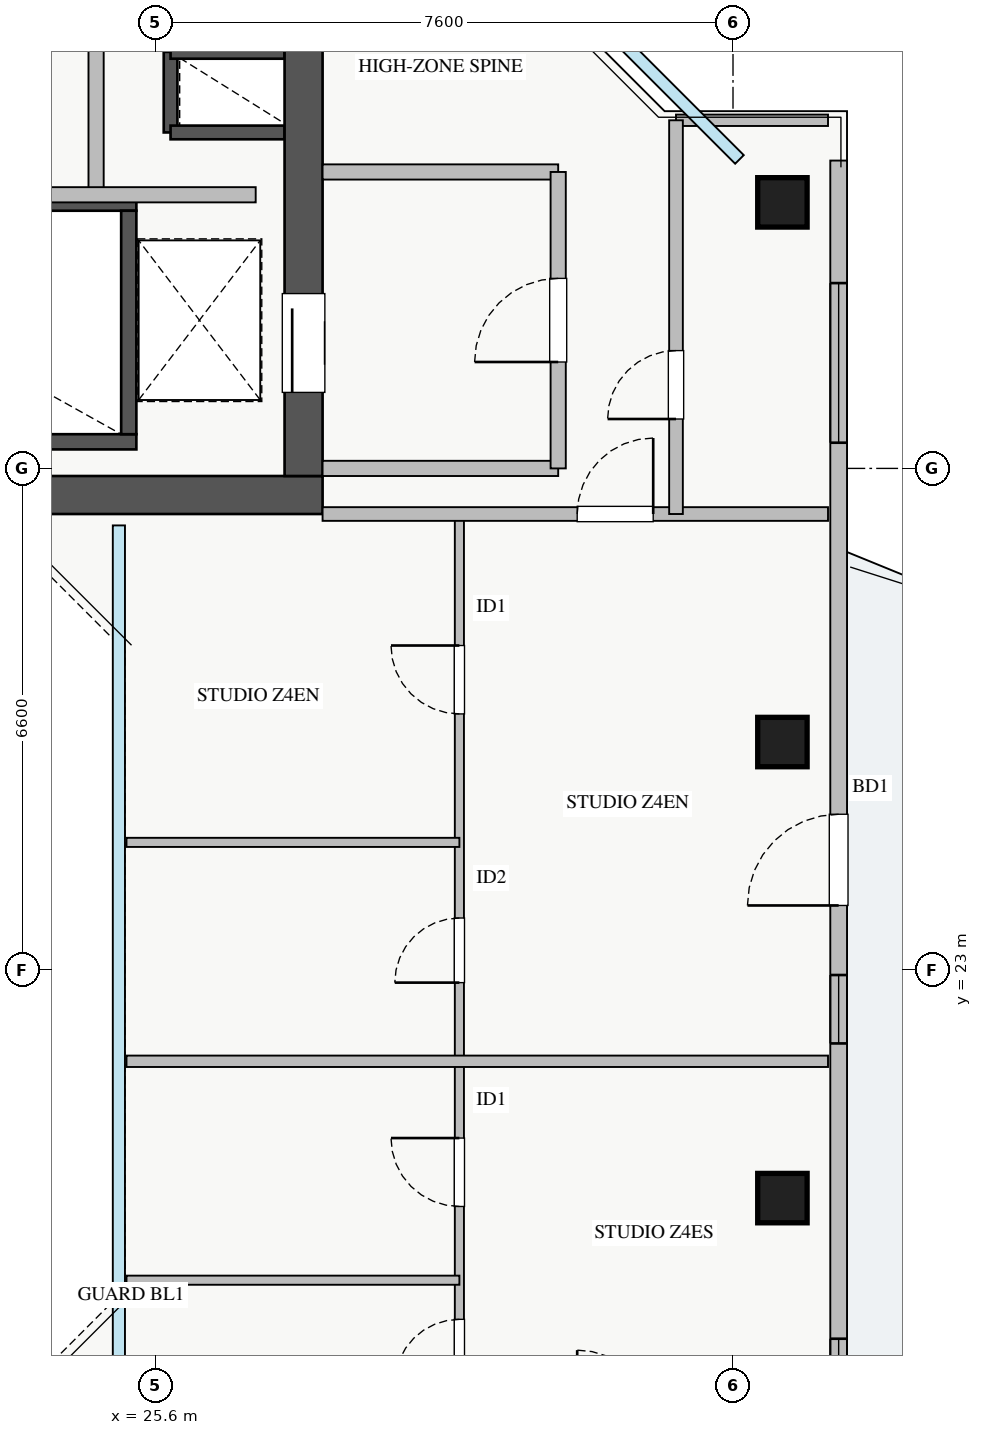
"""IFC4 building model, lengths in metres.
Left out: names, types, materials, properties, quantities, classifications, styles, units other than length and angle.
Written with IfcOpenShell. Run it as: python <this file> out.ifc"""

import sys

from ifc_helpers import new_model, si_unit, direction, frame, frame_2d, origin, origin_2d, place, context, subcontext, project, spatial, rectangle, extrude, source, transform, mapped, element, fill, save


model = new_model("IFC4")
c1 = context("Model", 3, precision=1e-05, world=origin(), true_north=direction((0.0, 1.0)))
c2 = subcontext(c1, "Body", "Model", "MODEL_VIEW")
j1 = project(units=[si_unit("LENGTHUNIT", "METRE"), si_unit("PLANEANGLEUNIT", "RADIAN")], contexts=[c1])
p1 = place(None, origin())
s1 = spatial("IfcSite", under=j1, at=p1, CompositionType="ELEMENT")
p2 = place(p1, origin())
s2 = spatial("IfcBuilding", under=s1, at=p2, CompositionType="ELEMENT")
p3 = place(p2, frame((0.0, 0.0, 253.5)))
s3 = spatial("IfcBuildingStorey", under=s2, at=p3, CompositionType="ELEMENT", Elevation=253.5)
p4 = place(p3, frame((25.8, 34.02, 0.0), z_axis=(0.0, 0.0, 1.0), x_axis=(0.0, 1.0, 0.0)))
e1 = element("IfcWall", 1, at=p4, inside=s3, PredefinedType="SHEAR", context=c2, shape_type="SweptSolid", body=[
    extrude(rectangle(XDim=1.06, YDim=0.18, at=frame_2d((0.53, 0.0))), origin(), (0.0, 0.0, 1.0), 3.07),
])
for number, where, z_axis, x_axis in (
    (2, (25.8, 35.08, 0.0), (0.0, 0.0, 1.0), (1.0, 0.0, 0.0)),
    (3, (25.8, 34.02, 0.0), (0.0, 0.0, 1.0), (1.0, 0.0, 0.0)),
):
    element("IfcWall", number, at=place(p3, frame(where, z_axis=z_axis, x_axis=x_axis)), inside=s3, PredefinedType="SHEAR", context=c2, shape_type="SweptSolid", body=[
        extrude(rectangle(XDim=1.5, YDim=0.18, at=frame_2d((0.75, 0.0))), origin(), (0.0, 0.0, 1.0), 3.07),
    ])
p5 = place(p3, frame((18.2, 29.95, 0.0), z_axis=(0.0, 0.0, 1.0), x_axis=(1.0, 0.0, 0.0)))
e4 = element("IfcWall", 4, at=p5, inside=s3, PredefinedType="SHEAR", context=c2, shape_type="SweptSolid", body=[
    extrude(rectangle(XDim=7.15, YDim=0.2, at=frame_2d((3.575, 0.0))), origin(), (0.0, 0.0, 1.0), 3.25),
])
p6 = place(p3, frame((18.2, 33.09, 0.0), z_axis=(0.0, 0.0, 1.0), x_axis=(1.0, 0.0, 0.0)))
e5 = element("IfcWall", 5, at=p6, inside=s3, PredefinedType="SHEAR", context=c2, shape_type="SweptSolid", body=[
    extrude(rectangle(XDim=7.15, YDim=0.2, at=frame_2d((3.575, 0.0))), origin(), (0.0, 0.0, 1.0), 3.25),
])
p7 = place(p6, frame((0.35, 0.0, 0.0)))
e6 = element("IfcOpeningElement", 6, at=p7, cuts=e5, PredefinedType="OPENING", context=c2, shape_type="SweptSolid", body=[
    extrude(rectangle(XDim=1.1, YDim=2.05, at=frame_2d((0.55, 1.025))), frame((0.0, 0.11, 0.0), z_axis=(0.0, -1.0, 0.0), x_axis=(1.0, 0.0, 0.0)), (0.0, 0.0, 1.0), 0.22),
])
p8 = place(p3, frame((25.25, 30.05, 0.0), z_axis=(0.0, 0.0, 1.0), x_axis=(0.0, 1.0, 0.0)))
e7 = element("IfcWall", 7, at=p8, inside=s3, PredefinedType="SHEAR", context=c2, shape_type="SweptSolid", body=[
    extrude(rectangle(XDim=2.94, YDim=0.2, at=frame_2d((1.47, 0.0))), origin(), (0.0, 0.0, 1.0), 3.25),
])
p9 = place(p3, frame((10.2, 29.25, 0.0), z_axis=(0.0, 0.0, 1.0), x_axis=(1.0, 0.0, 0.0)))
e8 = element("IfcWall", 8, at=p9, inside=s3, PredefinedType="SHEAR", context=c2, shape_type="SweptSolid", body=[
    extrude(rectangle(XDim=17.6, YDim=0.5, at=frame_2d((8.8, 0.0))), origin(), (0.0, 0.0, 1.0), 3.25),
])
p10 = place(p3, frame((27.55, 29.5, 0.0), z_axis=(0.0, 0.0, 1.0), x_axis=(0.0, 1.0, 0.0)))
e9 = element("IfcWall", 9, at=p10, inside=s3, PredefinedType="SHEAR", context=c2, shape_type="SweptSolid", body=[
    extrude(rectangle(XDim=6.2, YDim=0.5, at=frame_2d((3.1, 0.0))), origin(), (0.0, 0.0, 1.0), 3.25),
])
p11 = place(p10, frame((1.1, 0.0, 0.0)))
e10 = element("IfcOpeningElement", 10, at=p11, cuts=e9, PredefinedType="OPENING", context=c2, shape_type="SweptSolid", body=[
    extrude(rectangle(XDim=1.3, YDim=2.05, at=frame_2d((0.65, 1.025))), frame((0.0, 0.26, 0.0), z_axis=(0.0, -1.0, 0.0), x_axis=(1.0, 0.0, 0.0)), (0.0, 0.0, 1.0), 0.52),
])
m1 = source(origin(), c2, "Body", "SweptSolid", [
    extrude(rectangle(XDim=0.65, YDim=0.65, at=origin_2d()), origin(), (0.0, 0.0, 1.0), 3.25),
])
for number, where, z_axis, x_axis in (
    (11, (33.85, 20.0, 0.0), (0.0, 0.0, 1.0), (1.0, 0.0, 0.0)),
    (12, (33.85, 26.0, 0.0), (0.0, 0.0, 1.0), (1.0, 0.0, 0.0)),
    (13, (33.85, 33.1, 0.0), (0.0, 0.0, 1.0), (1.0, 0.0, 0.0)),
):
    element("IfcColumn", number, at=place(p3, frame(where, z_axis=z_axis, x_axis=x_axis)), inside=s3, PredefinedType="COLUMN", context=c2, shape_type="MappedRepresentation", body=[
        mapped(m1, transform((0.0, 0.0, 0.0), x_axis=(1.0, 0.0, 0.0), y_axis=(0.0, 1.0, 0.0), z_axis=(0.0, 0.0, 1.0), scale=1.0)),
    ])
p12 = place(p3, frame((34.59, 12.35, 0.0), z_axis=(0.0, 0.0, 1.0), x_axis=(0.0, 1.0, 0.0)))
e14 = element("IfcWall", 14, at=p12, inside=s3, PredefinedType="STANDARD", context=c2, shape_type="SweptSolid", body=[
    extrude(rectangle(XDim=21.3, YDim=0.22, at=frame_2d((10.65, 0.0))), origin(), (0.0, 0.0, 1.0), 2.61),
])
p13 = place(p12, frame((11.5, 0.0, 0.0)))
e15 = element("IfcOpeningElement", 15, at=p13, cuts=e14, PredefinedType="OPENING", context=c2, shape_type="SweptSolid", body=[
    extrude(rectangle(XDim=1.2, YDim=2.1, at=frame_2d((0.6, 1.05))), frame((0.0, 0.12, 0.0), z_axis=(0.0, -1.0, 0.0), x_axis=(1.0, 0.0, 0.0)), (0.0, 0.0, 1.0), 0.24),
])
p14 = place(p12, frame((1.463, 0.0, 0.9)))
e16 = element("IfcOpeningElement", 16, at=p14, cuts=e14, PredefinedType="OPENING", context=c2, shape_type="SweptSolid", body=[
    extrude(rectangle(XDim=2.4, YDim=1.48, at=frame_2d((1.2, 0.74))), frame((0.0, 0.12, 0.0), z_axis=(0.0, -1.0, 0.0), x_axis=(1.0, 0.0, 0.0)), (0.0, 0.0, 1.0), 0.24),
])
p15 = place(p12, frame((17.588, 0.0, 0.9)))
e17 = element("IfcOpeningElement", 17, at=p15, cuts=e14, PredefinedType="OPENING", context=c2, shape_type="SweptSolid", body=[
    extrude(rectangle(XDim=2.1, YDim=1.48, at=frame_2d((1.05, 0.74))), frame((0.0, 0.12, 0.0), z_axis=(0.0, -1.0, 0.0), x_axis=(1.0, 0.0, 0.0)), (0.0, 0.0, 1.0), 0.24),
])
p16 = place(p12, frame((4.9, 0.0, 0.9)))
e18 = element("IfcOpeningElement", 18, at=p16, cuts=e14, PredefinedType="OPENING", context=c2, shape_type="SweptSolid", body=[
    extrude(rectangle(XDim=0.9, YDim=1.2, at=frame_2d((0.45, 0.6))), frame((0.0, 0.12, 0.0), z_axis=(0.0, -1.0, 0.0), x_axis=(1.0, 0.0, 0.0)), (0.0, 0.0, 1.0), 0.24),
])
p17 = place(p12, frame((9.685, 0.0, 0.9)))
e19 = element("IfcOpeningElement", 19, at=p17, cuts=e14, PredefinedType="OPENING", context=c2, shape_type="SweptSolid", body=[
    extrude(rectangle(XDim=0.9, YDim=1.2, at=frame_2d((0.45, 0.6))), frame((0.0, 0.12, 0.0), z_axis=(0.0, -1.0, 0.0), x_axis=(1.0, 0.0, 0.0)), (0.0, 0.0, 1.0), 0.24),
])
for number, where, z_axis, x_axis in (
    (20, (27.8, 29.6, 0.0), (0.0, 0.0, 1.0), (1.0, 0.0, 0.0)),
    (21, (27.8, 33.5, 0.0), (0.0, 0.0, 1.0), (1.0, 0.0, 0.0)),
):
    element("IfcWall", number, at=place(p3, frame(where, z_axis=z_axis, x_axis=x_axis)), inside=s3, PredefinedType="PARTITIONING", context=c2, shape_type="SweptSolid", body=[
        extrude(rectangle(XDim=3.1, YDim=0.2, at=frame_2d((1.55, 0.0))), origin(), (0.0, 0.0, 1.0), 3.07),
    ])
p18 = place(p3, frame((30.9, 29.6, 0.0), z_axis=(0.0, 0.0, 1.0), x_axis=(0.0, 1.0, 0.0)))
e22 = element("IfcWall", 22, at=p18, inside=s3, PredefinedType="PARTITIONING", context=c2, shape_type="SweptSolid", body=[
    extrude(rectangle(XDim=3.9, YDim=0.2, at=frame_2d((1.95, 0.0))), origin(), (0.0, 0.0, 1.0), 2.771),
])
p19 = place(p18, frame((1.4, 0.0, 0.0)))
e23 = element("IfcOpeningElement", 23, at=p19, cuts=e22, PredefinedType="OPENING", context=c2, shape_type="SweptSolid", body=[
    extrude(rectangle(XDim=1.1, YDim=2.05, at=frame_2d((0.55, 1.025))), frame((0.0, 0.11, 0.0), z_axis=(0.0, -1.0, 0.0), x_axis=(1.0, 0.0, 0.0)), (0.0, 0.0, 1.0), 0.22),
])
p20 = place(p3, frame((24.82, 33.2, 0.0), z_axis=(0.0, 0.0, 1.0), x_axis=(0.0, 1.0, 0.0)))
e24 = element("IfcWall", 24, at=p20, inside=s3, PredefinedType="PARTITIONING", context=c2, shape_type="SweptSolid", body=[
    extrude(rectangle(XDim=2.65, YDim=0.2, at=frame_2d((1.325, 0.0))), origin(), (0.0, 0.0, 1.0), 3.07),
])
p21 = place(p3, frame((21.75, 33.2, 0.0), z_axis=(0.0, 0.0, 1.0), x_axis=(1.0, 0.0, 0.0)))
e25 = element("IfcWall", 25, at=p21, inside=s3, PredefinedType="PARTITIONING", context=c2, shape_type="SweptSolid", body=[
    extrude(rectangle(XDim=5.17, YDim=0.2, at=frame_2d((2.585, 0.0))), origin(), (0.0, 0.0, 1.0), 3.07),
])
p22 = place(p3, frame((29.6, 17.0, 0.0), z_axis=(0.0, 0.0, 1.0), x_axis=(0.0, 1.0, 0.0)))
e26 = element("IfcWall", 26, at=p22, inside=s3, PredefinedType="PLUMBINGWALL", context=c2, shape_type="SweptSolid", body=[
    extrude(rectangle(XDim=4.8, YDim=0.12, at=frame_2d((2.4, 0.0))), origin(), (0.0, 0.0, 1.0), 3.07),
])
p23 = place(p22, frame((0.555, 0.0, 0.0)))
e27 = element("IfcOpeningElement", 27, at=p23, cuts=e26, PredefinedType="OPENING", context=c2, shape_type="SweptSolid", body=[
    extrude(rectangle(XDim=0.85, YDim=2.05, at=frame_2d((0.425, 1.025))), frame((0.0, 0.07, 0.0), z_axis=(0.0, -1.0, 0.0), x_axis=(1.0, 0.0, 0.0)), (0.0, 0.0, 1.0), 0.14),
])
p24 = place(p22, frame((2.89, 0.0, 0.0)))
e28 = element("IfcOpeningElement", 28, at=p24, cuts=e26, PredefinedType="OPENING", context=c2, shape_type="SweptSolid", body=[
    extrude(rectangle(XDim=0.9, YDim=2.05, at=frame_2d((0.45, 1.025))), frame((0.0, 0.07, 0.0), z_axis=(0.0, -1.0, 0.0), x_axis=(1.0, 0.0, 0.0)), (0.0, 0.0, 1.0), 0.14),
])
p25 = place(p3, frame((25.22, 18.92, 0.0), z_axis=(0.0, 0.0, 1.0), x_axis=(1.0, 0.0, 0.0)))
e29 = element("IfcWall", 29, at=p25, inside=s3, PredefinedType="PLUMBINGWALL", context=c2, shape_type="SweptSolid", body=[
    extrude(rectangle(XDim=4.38, YDim=0.12, at=frame_2d((2.19, 0.0))), origin(), (0.0, 0.0, 1.0), 3.07),
])
p26 = place(p3, frame((29.6, 21.8, 0.0), z_axis=(0.0, 0.0, 1.0), x_axis=(0.0, 1.0, 0.0)))
e30 = element("IfcWall", 30, at=p26, inside=s3, PredefinedType="PLUMBINGWALL", context=c2, shape_type="SweptSolid", body=[
    extrude(rectangle(XDim=7.2, YDim=0.12, at=frame_2d((3.6, 0.0))), origin(), (0.0, 0.0, 1.0), 3.07),
])
p27 = place(p26, frame((1.035, 0.0, 0.0)))
e31 = element("IfcOpeningElement", 31, at=p27, cuts=e30, PredefinedType="OPENING", context=c2, shape_type="SweptSolid", body=[
    extrude(rectangle(XDim=0.85, YDim=2.05, at=frame_2d((0.425, 1.025))), frame((0.0, 0.07, 0.0), z_axis=(0.0, -1.0, 0.0), x_axis=(1.0, 0.0, 0.0)), (0.0, 0.0, 1.0), 0.14),
])
p28 = place(p26, frame((4.57, 0.0, 0.0)))
e32 = element("IfcOpeningElement", 32, at=p28, cuts=e30, PredefinedType="OPENING", context=c2, shape_type="SweptSolid", body=[
    extrude(rectangle(XDim=0.9, YDim=2.05, at=frame_2d((0.45, 1.025))), frame((0.0, 0.07, 0.0), z_axis=(0.0, -1.0, 0.0), x_axis=(1.0, 0.0, 0.0)), (0.0, 0.0, 1.0), 0.14),
])
p29 = place(p3, frame((25.22, 24.68, 0.0), z_axis=(0.0, 0.0, 1.0), x_axis=(1.0, 0.0, 0.0)))
e33 = element("IfcWall", 33, at=p29, inside=s3, PredefinedType="PLUMBINGWALL", context=c2, shape_type="SweptSolid", body=[
    extrude(rectangle(XDim=4.38, YDim=0.12, at=frame_2d((2.19, 0.0))), origin(), (0.0, 0.0, 1.0), 3.07),
])
p30 = place(p3, frame((25.22, 21.8, 0.0), z_axis=(0.0, 0.0, 1.0), x_axis=(1.0, 0.0, 0.0)))
e34 = element("IfcWall", 34, at=p30, inside=s3, PredefinedType="PARTITIONING", context=c2, shape_type="SweptSolid", body=[
    extrude(rectangle(XDim=9.23, YDim=0.15, at=frame_2d((4.615, 0.0))), origin(), (0.0, 0.0, 1.0), 3.07),
])
p31 = place(p3, frame((27.8, 29.0, 0.0), z_axis=(0.0, 0.0, 1.0), x_axis=(1.0, 0.0, 0.0)))
e35 = element("IfcWall", 35, at=p31, inside=s3, PredefinedType="PARTITIONING", context=c2, shape_type="SweptSolid", body=[
    extrude(rectangle(XDim=6.65, YDim=0.18, at=frame_2d((3.325, 0.0))), origin(), (0.0, 0.0, 1.0), 3.07),
])
p32 = place(p31, frame((3.35, 0.0, 0.0)))
e36 = element("IfcOpeningElement", 36, at=p32, cuts=e35, PredefinedType="OPENING", context=c2, shape_type="SweptSolid", body=[
    extrude(rectangle(XDim=1.0, YDim=2.05, at=frame_2d((0.5, 1.025))), frame((0.0, 0.1, 0.0), z_axis=(0.0, -1.0, 0.0), x_axis=(1.0, 0.0, 0.0)), (0.0, 0.0, 1.0), 0.2),
])
p33 = place(p3, frame((32.45, 34.18, 0.0), z_axis=(0.0, 0.0, 1.0), x_axis=(1.0, 0.0, 0.0)))
e37 = element("IfcWall", 37, at=p33, inside=s3, PredefinedType="PARTITIONING", context=c2, shape_type="SweptSolid", body=[
    extrude(rectangle(XDim=2.0, YDim=0.15, at=frame_2d((1.0, 0.0))), origin(), (0.0, 0.0, 1.0), 3.07),
])
p34 = place(p3, frame((32.45, 29.0, 0.0), z_axis=(0.0, 0.0, 1.0), x_axis=(0.0, 1.0, 0.0)))
e38 = element("IfcWall", 38, at=p34, inside=s3, PredefinedType="PARTITIONING", context=c2, shape_type="SweptSolid", body=[
    extrude(rectangle(XDim=5.18, YDim=0.18, at=frame_2d((2.59, 0.0))), origin(), (0.0, 0.0, 1.0), 3.07),
])
p35 = place(p34, frame((1.25, 0.0, 0.0)))
e39 = element("IfcOpeningElement", 39, at=p35, cuts=e38, PredefinedType="OPENING", context=c2, shape_type="SweptSolid", body=[
    extrude(rectangle(XDim=0.9, YDim=2.05, at=frame_2d((0.45, 1.025))), frame((0.0, 0.1, 0.0), z_axis=(0.0, -1.0, 0.0), x_axis=(1.0, 0.0, 0.0)), (0.0, 0.0, 1.0), 0.2),
])
m2 = source(origin(), c2, "Body", "SweptSolid", [
    extrude(rectangle(XDim=1.2, YDim=2.1, at=frame_2d((0.6, 1.05))), frame((0.0, 0.025, 0.0), z_axis=(0.0, -1.0, 0.0), x_axis=(1.0, 0.0, 0.0)), (0.0, 0.0, 1.0), 0.05),
])
p36 = place(p13, origin())
e40 = element("IfcDoor", 40, at=p36, inside=s3, OperationType="SINGLE_SWING_LEFT", PredefinedType="DOOR", context=c2, shape_type="MappedRepresentation", body=[
    mapped(m2, transform((0.0, 0.0, 0.0), x_axis=(1.0, 0.0, 0.0), y_axis=(0.0, 1.0, 0.0), z_axis=(0.0, 0.0, 1.0), scale=1.0)),
])
fill(e15, e40)
m3 = source(origin(), c2, "Body", "SweptSolid", [
    extrude(rectangle(XDim=2.1, YDim=1.48, at=frame_2d((1.05, 0.74))), frame((0.0, 0.03, 0.0), z_axis=(0.0, -1.0, 0.0), x_axis=(1.0, 0.0, 0.0)), (0.0, 0.0, 1.0), 0.06),
])
p37 = place(p15, origin())
e41 = element("IfcWindow", 41, at=p37, inside=s3, PartitioningType="TRIPLE_PANEL_VERTICAL", PredefinedType="WINDOW", context=c2, shape_type="MappedRepresentation", body=[
    mapped(m3, transform((0.0, 0.0, 0.0), x_axis=(1.0, 0.0, 0.0), y_axis=(0.0, 1.0, 0.0), z_axis=(0.0, 0.0, 1.0), scale=1.0)),
])
fill(e17, e41)
m4 = source(origin(), c2, "Body", "SweptSolid", [
    extrude(rectangle(XDim=1.3, YDim=2.05, at=frame_2d((0.65, 1.025))), frame((0.0, 0.025, 0.0), z_axis=(0.0, -1.0, 0.0), x_axis=(1.0, 0.0, 0.0)), (0.0, 0.0, 1.0), 0.05),
])
p38 = place(p11, origin())
e42 = element("IfcDoor", 42, at=p38, inside=s3, OperationType="SLIDING_TO_LEFT", PredefinedType="DOOR", context=c2, shape_type="MappedRepresentation", body=[
    mapped(m4, transform((0.0, 0.0, 0.0), x_axis=(1.0, 0.0, 0.0), y_axis=(0.0, 1.0, 0.0), z_axis=(0.0, 0.0, 1.0), scale=1.0)),
])
fill(e10, e42)
m5 = source(origin(), c2, "Body", "SweptSolid", [
    extrude(rectangle(XDim=1.1, YDim=2.05, at=frame_2d((0.55, 1.025))), frame((0.0, 0.025, 0.0), z_axis=(0.0, -1.0, 0.0), x_axis=(1.0, 0.0, 0.0)), (0.0, 0.0, 1.0), 0.05),
])
p39 = place(p19, origin())
e43 = element("IfcDoor", 43, at=p39, inside=s3, OperationType="SINGLE_SWING_LEFT", PredefinedType="DOOR", context=c2, shape_type="MappedRepresentation", body=[
    mapped(m5, transform((0.0, 0.0, 0.0), x_axis=(1.0, 0.0, 0.0), y_axis=(0.0, 1.0, 0.0), z_axis=(0.0, 0.0, 1.0), scale=1.0)),
])
fill(e23, e43)
m6 = source(origin(), c2, "Body", "SweptSolid", [
    extrude(rectangle(XDim=0.85, YDim=2.05, at=frame_2d((0.425, 1.025))), frame((0.0, 0.025, 0.0), z_axis=(0.0, -1.0, 0.0), x_axis=(1.0, 0.0, 0.0)), (0.0, 0.0, 1.0), 0.05),
])
p40 = place(p23, origin())
e44 = element("IfcDoor", 44, at=p40, inside=s3, OperationType="SINGLE_SWING_LEFT", PredefinedType="DOOR", context=c2, shape_type="MappedRepresentation", body=[
    mapped(m6, transform((0.0, 0.0, 0.0), x_axis=(1.0, 0.0, 0.0), y_axis=(0.0, 1.0, 0.0), z_axis=(0.0, 0.0, 1.0), scale=1.0)),
])
fill(e27, e44)
m7 = source(origin(), c2, "Body", "SweptSolid", [
    extrude(rectangle(XDim=0.9, YDim=2.05, at=frame_2d((0.45, 1.025))), frame((0.0, 0.025, 0.0), z_axis=(0.0, -1.0, 0.0), x_axis=(1.0, 0.0, 0.0)), (0.0, 0.0, 1.0), 0.05),
])
p41 = place(p24, origin())
e45 = element("IfcDoor", 45, at=p41, inside=s3, OperationType="SINGLE_SWING_RIGHT", PredefinedType="DOOR", context=c2, shape_type="MappedRepresentation", body=[
    mapped(m7, transform((0.0, 0.0, 0.0), x_axis=(1.0, 0.0, 0.0), y_axis=(0.0, 1.0, 0.0), z_axis=(0.0, 0.0, 1.0), scale=1.0)),
])
fill(e28, e45)
p42 = place(p27, origin())
e46 = element("IfcDoor", 46, at=p42, inside=s3, OperationType="SINGLE_SWING_LEFT", PredefinedType="DOOR", context=c2, shape_type="MappedRepresentation", body=[
    mapped(m6, transform((0.0, 0.0, 0.0), x_axis=(1.0, 0.0, 0.0), y_axis=(0.0, 1.0, 0.0), z_axis=(0.0, 0.0, 1.0), scale=1.0)),
])
fill(e31, e46)
p43 = place(p28, origin())
e47 = element("IfcDoor", 47, at=p43, inside=s3, OperationType="SINGLE_SWING_RIGHT", PredefinedType="DOOR", context=c2, shape_type="MappedRepresentation", body=[
    mapped(m7, transform((0.0, 0.0, 0.0), x_axis=(1.0, 0.0, 0.0), y_axis=(0.0, 1.0, 0.0), z_axis=(0.0, 0.0, 1.0), scale=1.0)),
])
fill(e32, e47)
m8 = source(origin(), c2, "Body", "SweptSolid", [
    extrude(rectangle(XDim=1.0, YDim=2.05, at=frame_2d((0.5, 1.025))), frame((0.0, 0.025, 0.0), z_axis=(0.0, -1.0, 0.0), x_axis=(1.0, 0.0, 0.0)), (0.0, 0.0, 1.0), 0.05),
])
p44 = place(p32, origin())
e48 = element("IfcDoor", 48, at=p44, inside=s3, OperationType="SINGLE_SWING_RIGHT", PredefinedType="DOOR", context=c2, shape_type="MappedRepresentation", body=[
    mapped(m8, transform((0.0, 0.0, 0.0), x_axis=(1.0, 0.0, 0.0), y_axis=(0.0, 1.0, 0.0), z_axis=(0.0, 0.0, 1.0), scale=1.0)),
])
fill(e36, e48)
p45 = place(p35, origin())
e49 = element("IfcDoor", 49, at=p45, inside=s3, OperationType="SINGLE_SWING_LEFT", PredefinedType="DOOR", context=c2, shape_type="MappedRepresentation", body=[
    mapped(m7, transform((0.0, 0.0, 0.0), x_axis=(1.0, 0.0, 0.0), y_axis=(0.0, 1.0, 0.0), z_axis=(0.0, 0.0, 1.0), scale=1.0)),
])
fill(e39, e49)
m9 = source(origin(), c2, "Body", "SweptSolid", [
    extrude(rectangle(XDim=0.9, YDim=1.2, at=frame_2d((0.45, 0.6))), frame((0.0, 0.03, 0.0), z_axis=(0.0, -1.0, 0.0), x_axis=(1.0, 0.0, 0.0)), (0.0, 0.0, 1.0), 0.06),
])
p46 = place(p16, origin())
e50 = element("IfcWindow", 50, at=p46, inside=s3, PartitioningType="SINGLE_PANEL", PredefinedType="WINDOW", context=c2, shape_type="MappedRepresentation", body=[
    mapped(m9, transform((0.0, 0.0, 0.0), x_axis=(1.0, 0.0, 0.0), y_axis=(0.0, 1.0, 0.0), z_axis=(0.0, 0.0, 1.0), scale=1.0)),
])
fill(e18, e50)
p47 = place(p17, origin())
e51 = element("IfcWindow", 51, at=p47, inside=s3, PartitioningType="SINGLE_PANEL", PredefinedType="WINDOW", context=c2, shape_type="MappedRepresentation", body=[
    mapped(m9, transform((0.0, 0.0, 0.0), x_axis=(1.0, 0.0, 0.0), y_axis=(0.0, 1.0, 0.0), z_axis=(0.0, 0.0, 1.0), scale=1.0)),
])
fill(e19, e51)
save(model, sys.argv[1])
